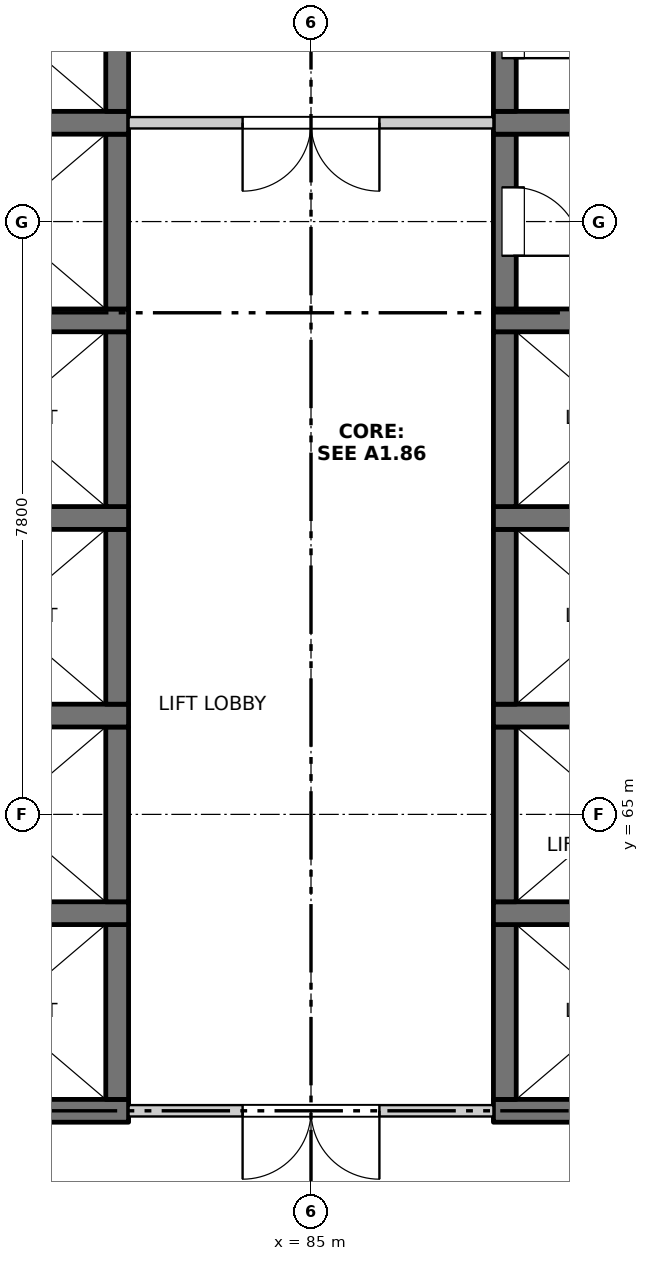
"""IFC4 building model, lengths in metres.
Left out: names, types, materials, properties, quantities, classifications, styles, units other than length and angle.
Written with IfcOpenShell. Run it as: python <this file> out.ifc"""

import sys

from ifc_helpers import new_model, si_unit, direction, frame, frame_2d, origin, place, context, subcontext, project, spatial, rectangle, extrude, element, fill, save


model = new_model("IFC4")
c1 = context("Model", 3, precision=1e-05, world=origin(), true_north=direction((0.0, 1.0)))
c2 = subcontext(c1, "Body", "Model", "MODEL_VIEW")
j1 = project(units=[si_unit("LENGTHUNIT", "METRE"), si_unit("PLANEANGLEUNIT", "RADIAN")], contexts=[c1])
p1 = place(None, origin())
s1 = spatial("IfcSite", under=j1, at=p1, CompositionType="ELEMENT")
p2 = place(p1, origin())
s2 = spatial("IfcBuilding", under=s1, at=p2, CompositionType="ELEMENT")
p3 = place(p2, frame((0.0, 0.0, 116.9)))
s3 = spatial("IfcBuildingStorey", under=s2, at=p3, CompositionType="ELEMENT", Elevation=116.9)
p4 = place(p3, frame((79.6, 61.1, -0.3), z_axis=(0.0, 0.0, 1.0), x_axis=(1.0, 0.0, 0.0)))
e1 = element("IfcWall", 1, at=p4, inside=s3, PredefinedType="SOLIDWALL", context=c2, shape_type="SweptSolid", body=[
    extrude(rectangle(XDim=3.0, YDim=0.3, at=frame_2d((1.5, 0.0))), origin(), (0.0, 0.0, 1.0), 6.8),
])
p5 = place(p3, frame((82.45, 61.25, -0.3), z_axis=(0.0, 0.0, 1.0), x_axis=(0.0, 1.0, 0.0)))
e2 = element("IfcWall", 2, at=p5, inside=s3, PredefinedType="SOLIDWALL", context=c2, shape_type="SweptSolid", body=[
    extrude(rectangle(XDim=2.3, YDim=0.3, at=frame_2d((1.15, 0.0))), origin(), (0.0, 0.0, 1.0), 6.8),
])
p6 = place(p3, frame((79.6, 63.7, -0.3), z_axis=(0.0, 0.0, 1.0), x_axis=(1.0, 0.0, 0.0)))
e3 = element("IfcWall", 3, at=p6, inside=s3, PredefinedType="SOLIDWALL", context=c2, shape_type="SweptSolid", body=[
    extrude(rectangle(XDim=3.0, YDim=0.3, at=frame_2d((1.5, 0.0))), origin(), (0.0, 0.0, 1.0), 6.8),
])
p7 = place(p3, frame((82.45, 63.85, -0.3), z_axis=(0.0, 0.0, 1.0), x_axis=(0.0, 1.0, 0.0)))
e4 = element("IfcWall", 4, at=p7, inside=s3, PredefinedType="SOLIDWALL", context=c2, shape_type="SweptSolid", body=[
    extrude(rectangle(XDim=2.3, YDim=0.3, at=frame_2d((1.15, 0.0))), origin(), (0.0, 0.0, 1.0), 6.8),
])
p8 = place(p3, frame((79.6, 66.3, -0.3), z_axis=(0.0, 0.0, 1.0), x_axis=(1.0, 0.0, 0.0)))
e5 = element("IfcWall", 5, at=p8, inside=s3, PredefinedType="SOLIDWALL", context=c2, shape_type="SweptSolid", body=[
    extrude(rectangle(XDim=3.0, YDim=0.3, at=frame_2d((1.5, 0.0))), origin(), (0.0, 0.0, 1.0), 6.8),
])
p9 = place(p3, frame((82.45, 66.45, -0.3), z_axis=(0.0, 0.0, 1.0), x_axis=(0.0, 1.0, 0.0)))
e6 = element("IfcWall", 6, at=p9, inside=s3, PredefinedType="SOLIDWALL", context=c2, shape_type="SweptSolid", body=[
    extrude(rectangle(XDim=2.3, YDim=0.3, at=frame_2d((1.15, 0.0))), origin(), (0.0, 0.0, 1.0), 6.8),
])
p10 = place(p3, frame((79.6, 68.9, -0.3), z_axis=(0.0, 0.0, 1.0), x_axis=(1.0, 0.0, 0.0)))
e7 = element("IfcWall", 7, at=p10, inside=s3, PredefinedType="SOLIDWALL", context=c2, shape_type="SweptSolid", body=[
    extrude(rectangle(XDim=3.0, YDim=0.3, at=frame_2d((1.5, 0.0))), origin(), (0.0, 0.0, 1.0), 6.8),
])
p11 = place(p3, frame((82.45, 69.05, -0.3), z_axis=(0.0, 0.0, 1.0), x_axis=(0.0, 1.0, 0.0)))
e8 = element("IfcWall", 8, at=p11, inside=s3, PredefinedType="SOLIDWALL", context=c2, shape_type="SweptSolid", body=[
    extrude(rectangle(XDim=2.3, YDim=0.3, at=frame_2d((1.15, 0.0))), origin(), (0.0, 0.0, 1.0), 6.8),
])
p12 = place(p3, frame((79.6, 71.5, -0.3), z_axis=(0.0, 0.0, 1.0), x_axis=(1.0, 0.0, 0.0)))
e9 = element("IfcWall", 9, at=p12, inside=s3, PredefinedType="SOLIDWALL", context=c2, shape_type="SweptSolid", body=[
    extrude(rectangle(XDim=3.0, YDim=0.3, at=frame_2d((1.5, 0.0))), origin(), (0.0, 0.0, 1.0), 6.8),
])
p13 = place(p3, frame((82.45, 71.65, -0.3), z_axis=(0.0, 0.0, 1.0), x_axis=(0.0, 1.0, 0.0)))
e10 = element("IfcWall", 10, at=p13, inside=s3, PredefinedType="SOLIDWALL", context=c2, shape_type="SweptSolid", body=[
    extrude(rectangle(XDim=2.3, YDim=0.3, at=frame_2d((1.15, 0.0))), origin(), (0.0, 0.0, 1.0), 6.8),
])
p14 = place(p3, frame((79.6, 74.1, -0.3), z_axis=(0.0, 0.0, 1.0), x_axis=(1.0, 0.0, 0.0)))
e11 = element("IfcWall", 11, at=p14, inside=s3, PredefinedType="SOLIDWALL", context=c2, shape_type="SweptSolid", body=[
    extrude(rectangle(XDim=3.0, YDim=0.3, at=frame_2d((1.5, 0.0))), origin(), (0.0, 0.0, 1.0), 6.8),
])
p15 = place(p3, frame((82.45, 74.25, -0.3), z_axis=(0.0, 0.0, 1.0), x_axis=(0.0, 1.0, 0.0)))
e12 = element("IfcWall", 12, at=p15, inside=s3, PredefinedType="SOLIDWALL", context=c2, shape_type="SweptSolid", body=[
    extrude(rectangle(XDim=2.3, YDim=0.3, at=frame_2d((1.15, 0.0))), origin(), (0.0, 0.0, 1.0), 6.8),
])
p16 = place(p3, frame((87.4, 61.1, -0.3), z_axis=(0.0, 0.0, 1.0), x_axis=(1.0, 0.0, 0.0)))
e13 = element("IfcWall", 13, at=p16, inside=s3, PredefinedType="SOLIDWALL", context=c2, shape_type="SweptSolid", body=[
    extrude(rectangle(XDim=3.0, YDim=0.3, at=frame_2d((1.5, 0.0))), origin(), (0.0, 0.0, 1.0), 6.8),
])
p17 = place(p3, frame((87.55, 61.25, -0.3), z_axis=(0.0, 0.0, 1.0), x_axis=(0.0, 1.0, 0.0)))
e14 = element("IfcWall", 14, at=p17, inside=s3, PredefinedType="SOLIDWALL", context=c2, shape_type="SweptSolid", body=[
    extrude(rectangle(XDim=2.3, YDim=0.3, at=frame_2d((1.15, 0.0))), origin(), (0.0, 0.0, 1.0), 6.8),
])
p18 = place(p3, frame((87.4, 63.7, -0.3), z_axis=(0.0, 0.0, 1.0), x_axis=(1.0, 0.0, 0.0)))
e15 = element("IfcWall", 15, at=p18, inside=s3, PredefinedType="SOLIDWALL", context=c2, shape_type="SweptSolid", body=[
    extrude(rectangle(XDim=3.0, YDim=0.3, at=frame_2d((1.5, 0.0))), origin(), (0.0, 0.0, 1.0), 6.8),
])
p19 = place(p3, frame((87.55, 63.85, -0.3), z_axis=(0.0, 0.0, 1.0), x_axis=(0.0, 1.0, 0.0)))
e16 = element("IfcWall", 16, at=p19, inside=s3, PredefinedType="SOLIDWALL", context=c2, shape_type="SweptSolid", body=[
    extrude(rectangle(XDim=2.3, YDim=0.3, at=frame_2d((1.15, 0.0))), origin(), (0.0, 0.0, 1.0), 6.8),
])
p20 = place(p3, frame((87.4, 66.3, -0.3), z_axis=(0.0, 0.0, 1.0), x_axis=(1.0, 0.0, 0.0)))
e17 = element("IfcWall", 17, at=p20, inside=s3, PredefinedType="SOLIDWALL", context=c2, shape_type="SweptSolid", body=[
    extrude(rectangle(XDim=3.0, YDim=0.3, at=frame_2d((1.5, 0.0))), origin(), (0.0, 0.0, 1.0), 6.8),
])
p21 = place(p3, frame((87.55, 66.45, -0.3), z_axis=(0.0, 0.0, 1.0), x_axis=(0.0, 1.0, 0.0)))
e18 = element("IfcWall", 18, at=p21, inside=s3, PredefinedType="SOLIDWALL", context=c2, shape_type="SweptSolid", body=[
    extrude(rectangle(XDim=2.3, YDim=0.3, at=frame_2d((1.15, 0.0))), origin(), (0.0, 0.0, 1.0), 6.8),
])
p22 = place(p3, frame((87.4, 68.9, -0.3), z_axis=(0.0, 0.0, 1.0), x_axis=(1.0, 0.0, 0.0)))
e19 = element("IfcWall", 19, at=p22, inside=s3, PredefinedType="SOLIDWALL", context=c2, shape_type="SweptSolid", body=[
    extrude(rectangle(XDim=3.0, YDim=0.3, at=frame_2d((1.5, 0.0))), origin(), (0.0, 0.0, 1.0), 6.8),
])
p23 = place(p3, frame((87.55, 69.05, -0.3), z_axis=(0.0, 0.0, 1.0), x_axis=(0.0, 1.0, 0.0)))
e20 = element("IfcWall", 20, at=p23, inside=s3, PredefinedType="SOLIDWALL", context=c2, shape_type="SweptSolid", body=[
    extrude(rectangle(XDim=2.3, YDim=0.3, at=frame_2d((1.15, 0.0))), origin(), (0.0, 0.0, 1.0), 6.8),
])
p24 = place(p3, frame((87.4, 71.5, -0.3), z_axis=(0.0, 0.0, 1.0), x_axis=(1.0, 0.0, 0.0)))
e21 = element("IfcWall", 21, at=p24, inside=s3, PredefinedType="SOLIDWALL", context=c2, shape_type="SweptSolid", body=[
    extrude(rectangle(XDim=3.0, YDim=0.3, at=frame_2d((1.5, 0.0))), origin(), (0.0, 0.0, 1.0), 6.8),
])
p25 = place(p3, frame((87.55, 71.65, -0.3), z_axis=(0.0, 0.0, 1.0), x_axis=(0.0, 1.0, 0.0)))
e22 = element("IfcWall", 22, at=p25, inside=s3, PredefinedType="SOLIDWALL", context=c2, shape_type="SweptSolid", body=[
    extrude(rectangle(XDim=2.3, YDim=0.3, at=frame_2d((1.15, 0.0))), origin(), (0.0, 0.0, 1.0), 6.8),
])
p26 = place(p25, frame((0.7, 0.0, 0.3)))
e23 = element("IfcOpeningElement", 23, at=p26, cuts=e22, PredefinedType="OPENING", context=c2, shape_type="SweptSolid", body=[
    extrude(rectangle(XDim=0.9, YDim=2.1, at=frame_2d((0.45, 1.05))), frame((0.0, 0.16, 0.0), z_axis=(0.0, -1.0, 0.0), x_axis=(1.0, 0.0, 0.0)), (0.0, 0.0, 1.0), 0.32),
])
p27 = place(p3, frame((87.4, 74.1, -0.3), z_axis=(0.0, 0.0, 1.0), x_axis=(1.0, 0.0, 0.0)))
e24 = element("IfcWall", 24, at=p27, inside=s3, PredefinedType="SOLIDWALL", context=c2, shape_type="SweptSolid", body=[
    extrude(rectangle(XDim=3.0, YDim=0.3, at=frame_2d((1.5, 0.0))), origin(), (0.0, 0.0, 1.0), 6.8),
])
p28 = place(p3, frame((87.55, 74.25, -0.3), z_axis=(0.0, 0.0, 1.0), x_axis=(0.0, 1.0, 0.0)))
e25 = element("IfcWall", 25, at=p28, inside=s3, PredefinedType="SOLIDWALL", context=c2, shape_type="SweptSolid", body=[
    extrude(rectangle(XDim=2.3, YDim=0.3, at=frame_2d((1.15, 0.0))), origin(), (0.0, 0.0, 1.0), 6.8),
])
p29 = place(p28, frame((0.7, 0.0, 0.3)))
e26 = element("IfcOpeningElement", 26, at=p29, cuts=e25, PredefinedType="OPENING", context=c2, shape_type="SweptSolid", body=[
    extrude(rectangle(XDim=0.9, YDim=2.1, at=frame_2d((0.45, 1.05))), frame((0.0, 0.16, 0.0), z_axis=(0.0, -1.0, 0.0), x_axis=(1.0, 0.0, 0.0)), (0.0, 0.0, 1.0), 0.32),
])
p30 = place(p3, frame((82.6, 61.1, 0.0), z_axis=(0.0, 0.0, 1.0), x_axis=(1.0, 0.0, 0.0)))
e27 = element("IfcWall", 27, at=p30, inside=s3, PredefinedType="PARTITIONING", context=c2, shape_type="SweptSolid", body=[
    extrude(rectangle(XDim=4.8, YDim=0.15, at=frame_2d((2.4, 0.0))), origin(), (0.0, 0.0, 1.0), 6.5),
])
p31 = place(p30, frame((1.5, 0.0, 0.0)))
e28 = element("IfcOpeningElement", 28, at=p31, cuts=e27, PredefinedType="OPENING", context=c2, shape_type="SweptSolid", body=[
    extrude(rectangle(XDim=1.8, YDim=2.1, at=frame_2d((0.9, 1.05))), frame((0.0, 0.085, 0.0), z_axis=(0.0, -1.0, 0.0), x_axis=(1.0, 0.0, 0.0)), (0.0, 0.0, 1.0), 0.17),
])
p32 = place(p3, frame((82.6, 74.1, 0.0), z_axis=(0.0, 0.0, 1.0), x_axis=(1.0, 0.0, 0.0)))
e29 = element("IfcWall", 29, at=p32, inside=s3, PredefinedType="PARTITIONING", context=c2, shape_type="SweptSolid", body=[
    extrude(rectangle(XDim=4.8, YDim=0.15, at=frame_2d((2.4, 0.0))), origin(), (0.0, 0.0, 1.0), 6.5),
])
p33 = place(p32, frame((1.5, 0.0, 0.0)))
e30 = element("IfcOpeningElement", 30, at=p33, cuts=e29, PredefinedType="OPENING", context=c2, shape_type="SweptSolid", body=[
    extrude(rectangle(XDim=1.8, YDim=2.1, at=frame_2d((0.9, 1.05))), frame((0.0, 0.085, 0.0), z_axis=(0.0, -1.0, 0.0), x_axis=(1.0, 0.0, 0.0)), (0.0, 0.0, 1.0), 0.17),
])
p34 = place(p31, origin())
e31 = element("IfcDoor", 31, at=p34, inside=s3, OperationType="DOUBLE_DOOR_SINGLE_SWING", PredefinedType="DOOR", context=c2, shape_type="SweptSolid", body=[
    extrude(rectangle(XDim=1.8, YDim=2.1, at=frame_2d((0.9, 1.05))), frame((0.0, 0.025, 0.0), z_axis=(0.0, -1.0, 0.0), x_axis=(1.0, 0.0, 0.0)), (0.0, 0.0, 1.0), 0.05),
])
fill(e28, e31)
p35 = place(p26, origin())
e32 = element("IfcDoor", 32, at=p35, inside=s3, OperationType="SINGLE_SWING_RIGHT", PredefinedType="DOOR", context=c2, shape_type="SweptSolid", body=[
    extrude(rectangle(XDim=0.9, YDim=2.1, at=frame_2d((0.45, 1.05))), frame((0.0, -0.085, 0.0), z_axis=(0.0, -1.0, 0.0), x_axis=(1.0, 0.0, 0.0)), (0.0, 0.0, 1.0), 0.05),
])
fill(e23, e32)
p36 = place(p33, origin())
e33 = element("IfcDoor", 33, at=p36, inside=s3, OperationType="DOUBLE_DOOR_SINGLE_SWING", PredefinedType="DOOR", context=c2, shape_type="SweptSolid", body=[
    extrude(rectangle(XDim=1.8, YDim=2.1, at=frame_2d((0.9, 1.05))), frame((0.0, 0.025, 0.0), z_axis=(0.0, -1.0, 0.0), x_axis=(1.0, 0.0, 0.0)), (0.0, 0.0, 1.0), 0.05),
])
fill(e30, e33)
p37 = place(p29, origin())
e34 = element("IfcDoor", 34, at=p37, inside=s3, OperationType="SINGLE_SWING_RIGHT", PredefinedType="DOOR", context=c2, shape_type="SweptSolid", body=[
    extrude(rectangle(XDim=0.9, YDim=2.1, at=frame_2d((0.45, 1.05))), frame((0.0, -0.085, 0.0), z_axis=(0.0, -1.0, 0.0), x_axis=(1.0, 0.0, 0.0)), (0.0, 0.0, 1.0), 0.05),
])
fill(e26, e34)
save(model, sys.argv[1])
